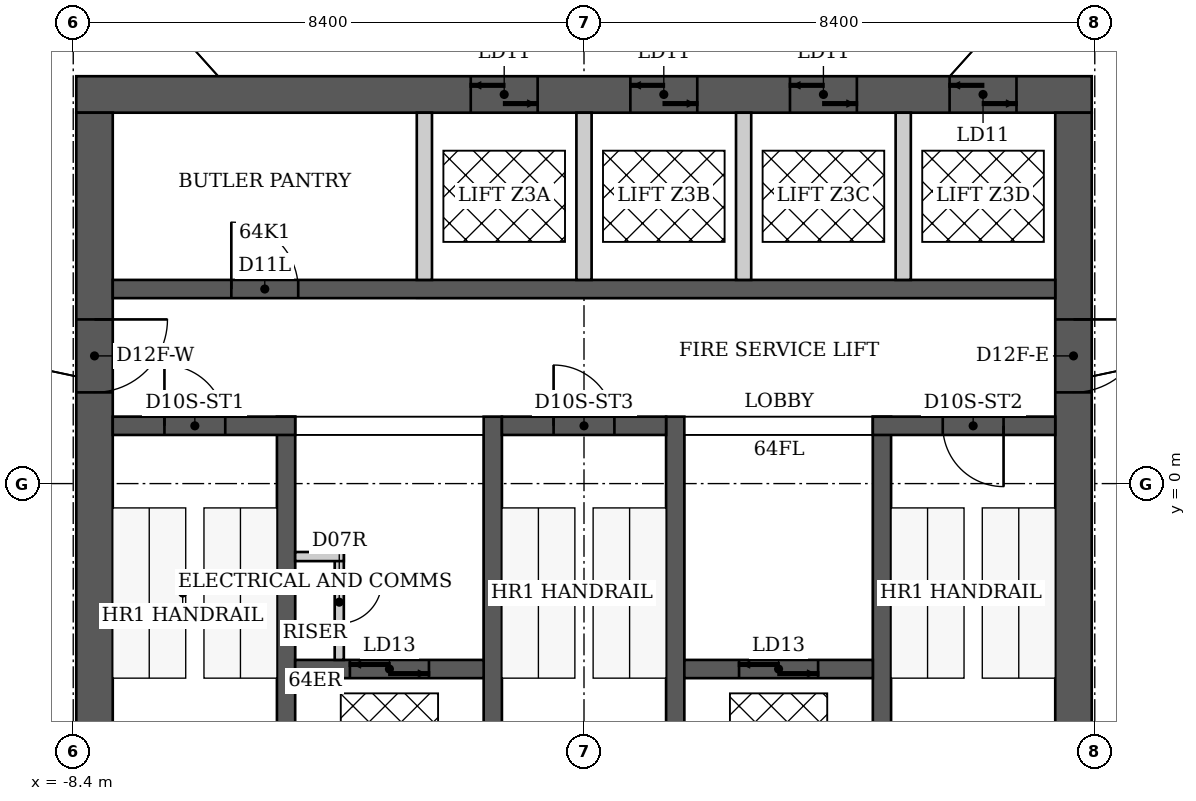
"""IFC4 building model, lengths in metres.
Left out: names, types, materials, properties, quantities, classifications, styles, units other than length and angle.
Written with IfcOpenShell. Run it as: python <this file> out.ifc"""

import sys

from ifc_helpers import new_model, si_unit, direction, frame, frame_2d, origin, place, context, subcontext, project, spatial, rectangle, extrude, element, fill, save


model = new_model("IFC4")
c1 = context("Model", 3, precision=1e-05, world=origin(), true_north=direction((0.0, 1.0)))
c2 = subcontext(c1, "Body", "Model", "MODEL_VIEW")
j1 = project(units=[si_unit("LENGTHUNIT", "METRE"), si_unit("PLANEANGLEUNIT", "RADIAN")], contexts=[c1])
p1 = place(None, origin())
s1 = spatial("IfcSite", under=j1, at=p1, CompositionType="ELEMENT")
p2 = place(p1, origin())
s2 = spatial("IfcBuilding", under=s1, at=p2, CompositionType="ELEMENT")
p3 = place(p2, frame((0.0, 0.0, 257.0)))
s3 = spatial("IfcBuildingStorey", under=s2, at=p3, CompositionType="ELEMENT", Elevation=257.0)
p4 = place(p3, frame((-8.35, 6.4, 0.0), z_axis=(0.0, 0.0, 1.0), x_axis=(1.0, 0.0, 0.0)))
e1 = element("IfcWall", 1, at=p4, inside=s3, PredefinedType="SHEAR", context=c2, shape_type="SweptSolid", body=[
    extrude(rectangle(XDim=16.7, YDim=0.6, at=frame_2d((8.35, 0.0))), origin(), (0.0, 0.0, 1.0), 3.8),
])
p5 = place(p4, frame((6.488, 0.0, 0.0)))
e2 = element("IfcOpeningElement", 2, at=p5, cuts=e1, PredefinedType="OPENING", context=c2, shape_type="SweptSolid", body=[
    extrude(rectangle(XDim=1.1, YDim=2.1, at=frame_2d((0.55, 1.05))), frame((0.0, 0.3, 0.0), z_axis=(0.0, -1.0, 0.0), x_axis=(1.0, 0.0, 0.0)), (0.0, 0.0, 1.0), 0.6),
])
p6 = place(p4, frame((9.113, 0.0, 0.0)))
e3 = element("IfcOpeningElement", 3, at=p6, cuts=e1, PredefinedType="OPENING", context=c2, shape_type="SweptSolid", body=[
    extrude(rectangle(XDim=1.1, YDim=2.1, at=frame_2d((0.55, 1.05))), frame((0.0, 0.3, 0.0), z_axis=(0.0, -1.0, 0.0), x_axis=(1.0, 0.0, 0.0)), (0.0, 0.0, 1.0), 0.6),
])
p7 = place(p4, frame((11.738, 0.0, 0.0)))
e4 = element("IfcOpeningElement", 4, at=p7, cuts=e1, PredefinedType="OPENING", context=c2, shape_type="SweptSolid", body=[
    extrude(rectangle(XDim=1.1, YDim=2.1, at=frame_2d((0.55, 1.05))), frame((0.0, 0.3, 0.0), z_axis=(0.0, -1.0, 0.0), x_axis=(1.0, 0.0, 0.0)), (0.0, 0.0, 1.0), 0.6),
])
p8 = place(p4, frame((14.363, 0.0, 0.0)))
e5 = element("IfcOpeningElement", 5, at=p8, cuts=e1, PredefinedType="OPENING", context=c2, shape_type="SweptSolid", body=[
    extrude(rectangle(XDim=1.1, YDim=2.1, at=frame_2d((0.55, 1.05))), frame((0.0, 0.3, 0.0), z_axis=(0.0, -1.0, 0.0), x_axis=(1.0, 0.0, 0.0)), (0.0, 0.0, 1.0), 0.6),
])
p9 = place(p3, frame((-8.05, -6.1, 0.0), z_axis=(0.0, 0.0, 1.0), x_axis=(0.0, 1.0, 0.0)))
e6 = element("IfcWall", 6, at=p9, inside=s3, PredefinedType="SHEAR", context=c2, shape_type="SweptSolid", body=[
    extrude(rectangle(XDim=12.2, YDim=0.6, at=frame_2d((6.1, 0.0))), origin(), (0.0, 0.0, 1.0), 3.8),
])
p10 = place(p9, frame((7.6, 0.0, 0.0)))
e7 = element("IfcOpeningElement", 7, at=p10, cuts=e6, PredefinedType="OPENING", context=c2, shape_type="SweptSolid", body=[
    extrude(rectangle(XDim=1.2, YDim=2.2, at=frame_2d((0.6, 1.1))), frame((0.0, 0.3, 0.0), z_axis=(0.0, -1.0, 0.0), x_axis=(1.0, 0.0, 0.0)), (0.0, 0.0, 1.0), 0.6),
])
p11 = place(p3, frame((8.05, -6.1, 0.0), z_axis=(0.0, 0.0, 1.0), x_axis=(0.0, 1.0, 0.0)))
e8 = element("IfcWall", 8, at=p11, inside=s3, PredefinedType="SHEAR", context=c2, shape_type="SweptSolid", body=[
    extrude(rectangle(XDim=12.2, YDim=0.6, at=frame_2d((6.1, 0.0))), origin(), (0.0, 0.0, 1.0), 3.8),
])
p12 = place(p11, frame((7.6, 0.0, 0.0)))
e9 = element("IfcOpeningElement", 9, at=p12, cuts=e8, PredefinedType="OPENING", context=c2, shape_type="SweptSolid", body=[
    extrude(rectangle(XDim=1.2, YDim=2.2, at=frame_2d((0.6, 1.1))), frame((0.0, 0.3, 0.0), z_axis=(0.0, -1.0, 0.0), x_axis=(1.0, 0.0, 0.0)), (0.0, 0.0, 1.0), 0.6),
])
for number, where, z_axis, x_axis in (
    (10, (-4.9, -6.1, 0.0), (0.0, 0.0, 1.0), (0.0, 1.0, 0.0)),
    (11, (-1.5, -6.1, 0.0), (0.0, 0.0, 1.0), (0.0, 1.0, 0.0)),
    (12, (1.5, -6.1, 0.0), (0.0, 0.0, 1.0), (0.0, 1.0, 0.0)),
    (13, (4.9, -6.1, 0.0), (0.0, 0.0, 1.0), (0.0, 1.0, 0.0)),
):
    element("IfcWall", number, at=place(p3, frame(where, z_axis=z_axis, x_axis=x_axis)), inside=s3, PredefinedType="SHEAR", context=c2, shape_type="SweptSolid", body=[
        extrude(rectangle(XDim=7.2, YDim=0.3, at=frame_2d((3.6, 0.0))), origin(), (0.0, 0.0, 1.0), 3.8),
    ])
p13 = place(p3, frame((-7.75, 0.95, 0.0), z_axis=(0.0, 0.0, 1.0), x_axis=(1.0, 0.0, 0.0)))
e14 = element("IfcWall", 14, at=p13, inside=s3, PredefinedType="SHEAR", context=c2, shape_type="SweptSolid", body=[
    extrude(rectangle(XDim=3.0, YDim=0.3, at=frame_2d((1.5, 0.0))), origin(), (0.0, 0.0, 1.0), 3.8),
])
p14 = place(p13, frame((0.85, 0.0, 0.0)))
e15 = element("IfcOpeningElement", 15, at=p14, cuts=e14, PredefinedType="OPENING", context=c2, shape_type="SweptSolid", body=[
    extrude(rectangle(XDim=1.0, YDim=2.2, at=frame_2d((0.5, 1.1))), frame((0.0, 0.15, 0.0), z_axis=(0.0, -1.0, 0.0), x_axis=(1.0, 0.0, 0.0)), (0.0, 0.0, 1.0), 0.3),
])
p15 = place(p3, frame((-1.35, 0.95, 0.0), z_axis=(0.0, 0.0, 1.0), x_axis=(1.0, 0.0, 0.0)))
e16 = element("IfcWall", 16, at=p15, inside=s3, PredefinedType="SHEAR", context=c2, shape_type="SweptSolid", body=[
    extrude(rectangle(XDim=2.7, YDim=0.3, at=frame_2d((1.35, 0.0))), origin(), (0.0, 0.0, 1.0), 3.8),
])
p16 = place(p15, frame((0.85, 0.0, 0.0)))
e17 = element("IfcOpeningElement", 17, at=p16, cuts=e16, PredefinedType="OPENING", context=c2, shape_type="SweptSolid", body=[
    extrude(rectangle(XDim=1.0, YDim=2.2, at=frame_2d((0.5, 1.1))), frame((0.0, 0.15, 0.0), z_axis=(0.0, -1.0, 0.0), x_axis=(1.0, 0.0, 0.0)), (0.0, 0.0, 1.0), 0.3),
])
p17 = place(p3, frame((4.75, 0.95, 0.0), z_axis=(0.0, 0.0, 1.0), x_axis=(1.0, 0.0, 0.0)))
e18 = element("IfcWall", 18, at=p17, inside=s3, PredefinedType="SHEAR", context=c2, shape_type="SweptSolid", body=[
    extrude(rectangle(XDim=3.0, YDim=0.3, at=frame_2d((1.5, 0.0))), origin(), (0.0, 0.0, 1.0), 3.8),
])
p18 = place(p17, frame((1.15, 0.0, 0.0)))
e19 = element("IfcOpeningElement", 19, at=p18, cuts=e18, PredefinedType="OPENING", context=c2, shape_type="SweptSolid", body=[
    extrude(rectangle(XDim=1.0, YDim=2.2, at=frame_2d((0.5, 1.1))), frame((0.0, 0.15, 0.0), z_axis=(0.0, -1.0, 0.0), x_axis=(1.0, 0.0, 0.0)), (0.0, 0.0, 1.0), 0.3),
])
p19 = place(p3, frame((-4.75, -3.05, 0.0), z_axis=(0.0, 0.0, 1.0), x_axis=(1.0, 0.0, 0.0)))
e20 = element("IfcWall", 20, at=p19, inside=s3, PredefinedType="SHEAR", context=c2, shape_type="SweptSolid", body=[
    extrude(rectangle(XDim=3.1, YDim=0.3, at=frame_2d((1.55, 0.0))), origin(), (0.0, 0.0, 1.0), 3.8),
])
p20 = place(p19, frame((0.9, 0.0, 0.0)))
e21 = element("IfcOpeningElement", 21, at=p20, cuts=e20, PredefinedType="OPENING", context=c2, shape_type="SweptSolid", body=[
    extrude(rectangle(XDim=1.3, YDim=2.1, at=frame_2d((0.65, 1.05))), frame((0.0, 0.15, 0.0), z_axis=(0.0, -1.0, 0.0), x_axis=(1.0, 0.0, 0.0)), (0.0, 0.0, 1.0), 0.3),
])
p21 = place(p3, frame((1.65, -3.05, 0.0), z_axis=(0.0, 0.0, 1.0), x_axis=(1.0, 0.0, 0.0)))
e22 = element("IfcWall", 22, at=p21, inside=s3, PredefinedType="SHEAR", context=c2, shape_type="SweptSolid", body=[
    extrude(rectangle(XDim=3.1, YDim=0.3, at=frame_2d((1.55, 0.0))), origin(), (0.0, 0.0, 1.0), 3.8),
])
p22 = place(p21, frame((0.9, 0.0, 0.0)))
e23 = element("IfcOpeningElement", 23, at=p22, cuts=e22, PredefinedType="OPENING", context=c2, shape_type="SweptSolid", body=[
    extrude(rectangle(XDim=1.3, YDim=2.1, at=frame_2d((0.65, 1.05))), frame((0.0, 0.15, 0.0), z_axis=(0.0, -1.0, 0.0), x_axis=(1.0, 0.0, 0.0)), (0.0, 0.0, 1.0), 0.3),
])
p23 = place(p3, frame((-7.75, 3.2, 0.0), z_axis=(0.0, 0.0, 1.0), x_axis=(1.0, 0.0, 0.0)))
e24 = element("IfcWall", 24, at=p23, inside=s3, PredefinedType="SHEAR", context=c2, shape_type="SweptSolid", body=[
    extrude(rectangle(XDim=15.5, YDim=0.3, at=frame_2d((7.75, 0.0))), origin(), (0.0, 0.0, 1.0), 3.8),
])
p24 = place(p23, frame((1.95, 0.0, 0.0)))
e25 = element("IfcOpeningElement", 25, at=p24, cuts=e24, PredefinedType="OPENING", context=c2, shape_type="SweptSolid", body=[
    extrude(rectangle(XDim=1.1, YDim=2.2, at=frame_2d((0.55, 1.1))), frame((0.0, 0.15, 0.0), z_axis=(0.0, -1.0, 0.0), x_axis=(1.0, 0.0, 0.0)), (0.0, 0.0, 1.0), 0.3),
])
for number, where, z_axis, x_axis in (
    (26, (-2.625, 3.35, 0.0), (0.0, 0.0, 1.0), (0.0, 1.0, 0.0)),
    (27, (0.0, 3.35, 0.0), (0.0, 0.0, 1.0), (0.0, 1.0, 0.0)),
    (28, (2.625, 3.35, 0.0), (0.0, 0.0, 1.0), (0.0, 1.0, 0.0)),
    (29, (5.25, 3.35, 0.0), (0.0, 0.0, 1.0), (0.0, 1.0, 0.0)),
):
    element("IfcWall", number, at=place(p3, frame(where, z_axis=z_axis, x_axis=x_axis)), inside=s3, PredefinedType="PARTITIONING", context=c2, shape_type="SweptSolid", body=[
        extrude(rectangle(XDim=2.75, YDim=0.25, at=frame_2d((1.375, 0.0))), origin(), (0.0, 0.0, 1.0), 3.8),
    ])
p25 = place(p3, frame((-11.73, -3.33, 0.0), z_axis=(0.0, 0.0, 1.0), x_axis=(0.499214067722, -0.866478686748, 0.0)))
e30 = element("IfcWall", 30, at=p25, inside=s3, PredefinedType="PARTITIONING", context=c2, shape_type="SweptSolid", body=[
    extrude(rectangle(XDim=8.413, YDim=0.2, at=frame_2d((4.207, 0.0))), origin(), (0.0, 0.0, 1.0), 3.64),
])
p26 = place(p25, frame((3.707, 0.0, 0.0)))
e31 = element("IfcOpeningElement", 31, at=p26, cuts=e30, PredefinedType="OPENING", context=c2, shape_type="SweptSolid", body=[
    extrude(rectangle(XDim=1.0, YDim=2.13, at=frame_2d((0.5, 1.065))), frame((0.0, 0.1, 0.0), z_axis=(0.0, -1.0, 0.0), x_axis=(1.0, 0.0, 0.0)), (0.0, 0.0, 1.0), 0.2),
])
p27 = place(p3, frame((8.75, -8.5, 0.0), z_axis=(0.0, 0.0, 1.0), x_axis=(0.500093981358, 0.865971136822, 0.0)))
e32 = element("IfcWall", 32, at=p27, inside=s3, PredefinedType="PARTITIONING", context=c2, shape_type="SweptSolid", body=[
    extrude(rectangle(XDim=8.418, YDim=0.2, at=frame_2d((4.209, 0.0))), origin(), (0.0, 0.0, 1.0), 3.64),
])
p28 = place(p27, frame((3.709, 0.0, 0.0)))
e33 = element("IfcOpeningElement", 33, at=p28, cuts=e32, PredefinedType="OPENING", context=c2, shape_type="SweptSolid", body=[
    extrude(rectangle(XDim=1.0, YDim=2.13, at=frame_2d((0.5, 1.065))), frame((0.0, 0.1, 0.0), z_axis=(0.0, -1.0, 0.0), x_axis=(1.0, 0.0, 0.0)), (0.0, 0.0, 1.0), 0.2),
])
p29 = place(p3, frame((-4.025, -2.9, 0.0), z_axis=(0.0, 0.0, 1.0), x_axis=(0.0, 1.0, 0.0)))
e34 = element("IfcWall", 34, at=p29, inside=s3, PredefinedType="PARTITIONING", context=c2, shape_type="SweptSolid", body=[
    extrude(rectangle(XDim=1.775, YDim=0.15, at=frame_2d((0.887, 0.0))), origin(), (0.0, 0.0, 1.0), 3.64),
])
p30 = place(p29, frame((0.6, 0.0, 0.0)))
e35 = element("IfcOpeningElement", 35, at=p30, cuts=e34, PredefinedType="OPENING", context=c2, shape_type="SweptSolid", body=[
    extrude(rectangle(XDim=0.7, YDim=2.1, at=frame_2d((0.35, 1.05))), frame((0.0, 0.075, 0.0), z_axis=(0.0, -1.0, 0.0), x_axis=(1.0, 0.0, 0.0)), (0.0, 0.0, 1.0), 0.15),
])
p31 = place(p3, frame((-4.75, -1.2, 0.0), z_axis=(0.0, 0.0, 1.0), x_axis=(1.0, 0.0, 0.0)))
e36 = element("IfcWall", 36, at=p31, inside=s3, PredefinedType="PARTITIONING", context=c2, shape_type="SweptSolid", body=[
    extrude(rectangle(XDim=0.8, YDim=0.15, at=frame_2d((0.4, 0.0))), origin(), (0.0, 0.0, 1.0), 3.64),
])
p32 = place(p14, origin())
e37 = element("IfcDoor", 37, at=p32, inside=s3, OperationType="SINGLE_SWING_LEFT", PredefinedType="DOOR", context=c2, shape_type="SweptSolid", body=[
    extrude(rectangle(XDim=1.0, YDim=2.2, at=frame_2d((0.5, 1.1))), frame((0.0, 0.025, 0.0), z_axis=(0.0, -1.0, 0.0), x_axis=(1.0, 0.0, 0.0)), (0.0, 0.0, 1.0), 0.05),
])
fill(e15, e37)
p33 = place(p16, origin())
e38 = element("IfcDoor", 38, at=p33, inside=s3, OperationType="SINGLE_SWING_LEFT", PredefinedType="DOOR", context=c2, shape_type="SweptSolid", body=[
    extrude(rectangle(XDim=1.0, YDim=2.2, at=frame_2d((0.5, 1.1))), frame((0.0, 0.025, 0.0), z_axis=(0.0, -1.0, 0.0), x_axis=(1.0, 0.0, 0.0)), (0.0, 0.0, 1.0), 0.05),
])
fill(e17, e38)
p34 = place(p18, origin())
e39 = element("IfcDoor", 39, at=p34, inside=s3, OperationType="SINGLE_SWING_RIGHT", PredefinedType="DOOR", context=c2, shape_type="SweptSolid", body=[
    extrude(rectangle(XDim=1.0, YDim=2.2, at=frame_2d((0.5, 1.1))), frame((0.0, 0.025, 0.0), z_axis=(0.0, -1.0, 0.0), x_axis=(1.0, 0.0, 0.0)), (0.0, 0.0, 1.0), 0.05),
])
fill(e19, e39)
p35 = place(p10, origin())
e40 = element("IfcDoor", 40, at=p35, inside=s3, OperationType="SINGLE_SWING_RIGHT", PredefinedType="DOOR", context=c2, shape_type="SweptSolid", body=[
    extrude(rectangle(XDim=1.2, YDim=2.2, at=frame_2d((0.6, 1.1))), frame((0.0, 0.025, 0.0), z_axis=(0.0, -1.0, 0.0), x_axis=(1.0, 0.0, 0.0)), (0.0, 0.0, 1.0), 0.05),
])
fill(e7, e40)
p36 = place(p12, origin())
e41 = element("IfcDoor", 41, at=p36, inside=s3, OperationType="SINGLE_SWING_RIGHT", PredefinedType="DOOR", context=c2, shape_type="SweptSolid", body=[
    extrude(rectangle(XDim=1.2, YDim=2.2, at=frame_2d((0.6, 1.1))), frame((0.0, 0.025, 0.0), z_axis=(0.0, -1.0, 0.0), x_axis=(1.0, 0.0, 0.0)), (0.0, 0.0, 1.0), 0.05),
])
fill(e9, e41)
p37 = place(p30, origin())
e42 = element("IfcDoor", 42, at=p37, inside=s3, OperationType="SINGLE_SWING_RIGHT", PredefinedType="DOOR", context=c2, shape_type="SweptSolid", body=[
    extrude(rectangle(XDim=0.7, YDim=2.1, at=frame_2d((0.35, 1.05))), frame((0.0, 0.025, 0.0), z_axis=(0.0, -1.0, 0.0), x_axis=(1.0, 0.0, 0.0)), (0.0, 0.0, 1.0), 0.05),
])
fill(e35, e42)
p38 = place(p24, origin())
e43 = element("IfcDoor", 43, at=p38, inside=s3, OperationType="SINGLE_SWING_LEFT", PredefinedType="DOOR", context=c2, shape_type="SweptSolid", body=[
    extrude(rectangle(XDim=1.1, YDim=2.2, at=frame_2d((0.55, 1.1))), frame((0.0, 0.025, 0.0), z_axis=(0.0, -1.0, 0.0), x_axis=(1.0, 0.0, 0.0)), (0.0, 0.0, 1.0), 0.05),
])
fill(e25, e43)
p39 = place(p5, origin())
e44 = element("IfcDoor", 44, at=p39, inside=s3, OperationType="DOUBLE_DOOR_SLIDING", PredefinedType="DOOR", context=c2, shape_type="SweptSolid", body=[
    extrude(rectangle(XDim=1.1, YDim=2.1, at=frame_2d((0.55, 1.05))), frame((0.0, 0.025, 0.0), z_axis=(0.0, -1.0, 0.0), x_axis=(1.0, 0.0, 0.0)), (0.0, 0.0, 1.0), 0.05),
])
fill(e2, e44)
p40 = place(p6, origin())
e45 = element("IfcDoor", 45, at=p40, inside=s3, OperationType="DOUBLE_DOOR_SLIDING", PredefinedType="DOOR", context=c2, shape_type="SweptSolid", body=[
    extrude(rectangle(XDim=1.1, YDim=2.1, at=frame_2d((0.55, 1.05))), frame((0.0, 0.025, 0.0), z_axis=(0.0, -1.0, 0.0), x_axis=(1.0, 0.0, 0.0)), (0.0, 0.0, 1.0), 0.05),
])
fill(e3, e45)
p41 = place(p7, origin())
e46 = element("IfcDoor", 46, at=p41, inside=s3, OperationType="DOUBLE_DOOR_SLIDING", PredefinedType="DOOR", context=c2, shape_type="SweptSolid", body=[
    extrude(rectangle(XDim=1.1, YDim=2.1, at=frame_2d((0.55, 1.05))), frame((0.0, 0.025, 0.0), z_axis=(0.0, -1.0, 0.0), x_axis=(1.0, 0.0, 0.0)), (0.0, 0.0, 1.0), 0.05),
])
fill(e4, e46)
p42 = place(p8, origin())
e47 = element("IfcDoor", 47, at=p42, inside=s3, OperationType="DOUBLE_DOOR_SLIDING", PredefinedType="DOOR", context=c2, shape_type="SweptSolid", body=[
    extrude(rectangle(XDim=1.1, YDim=2.1, at=frame_2d((0.55, 1.05))), frame((0.0, 0.025, 0.0), z_axis=(0.0, -1.0, 0.0), x_axis=(1.0, 0.0, 0.0)), (0.0, 0.0, 1.0), 0.05),
])
fill(e5, e47)
p43 = place(p20, origin())
e48 = element("IfcDoor", 48, at=p43, inside=s3, OperationType="DOUBLE_DOOR_SLIDING", PredefinedType="DOOR", context=c2, shape_type="SweptSolid", body=[
    extrude(rectangle(XDim=1.3, YDim=2.1, at=frame_2d((0.65, 1.05))), frame((0.0, 0.025, 0.0), z_axis=(0.0, -1.0, 0.0), x_axis=(1.0, 0.0, 0.0)), (0.0, 0.0, 1.0), 0.05),
])
fill(e21, e48)
p44 = place(p22, origin())
e49 = element("IfcDoor", 49, at=p44, inside=s3, OperationType="DOUBLE_DOOR_SLIDING", PredefinedType="DOOR", context=c2, shape_type="SweptSolid", body=[
    extrude(rectangle(XDim=1.3, YDim=2.1, at=frame_2d((0.65, 1.05))), frame((0.0, 0.025, 0.0), z_axis=(0.0, -1.0, 0.0), x_axis=(1.0, 0.0, 0.0)), (0.0, 0.0, 1.0), 0.05),
])
fill(e23, e49)
save(model, sys.argv[1])
